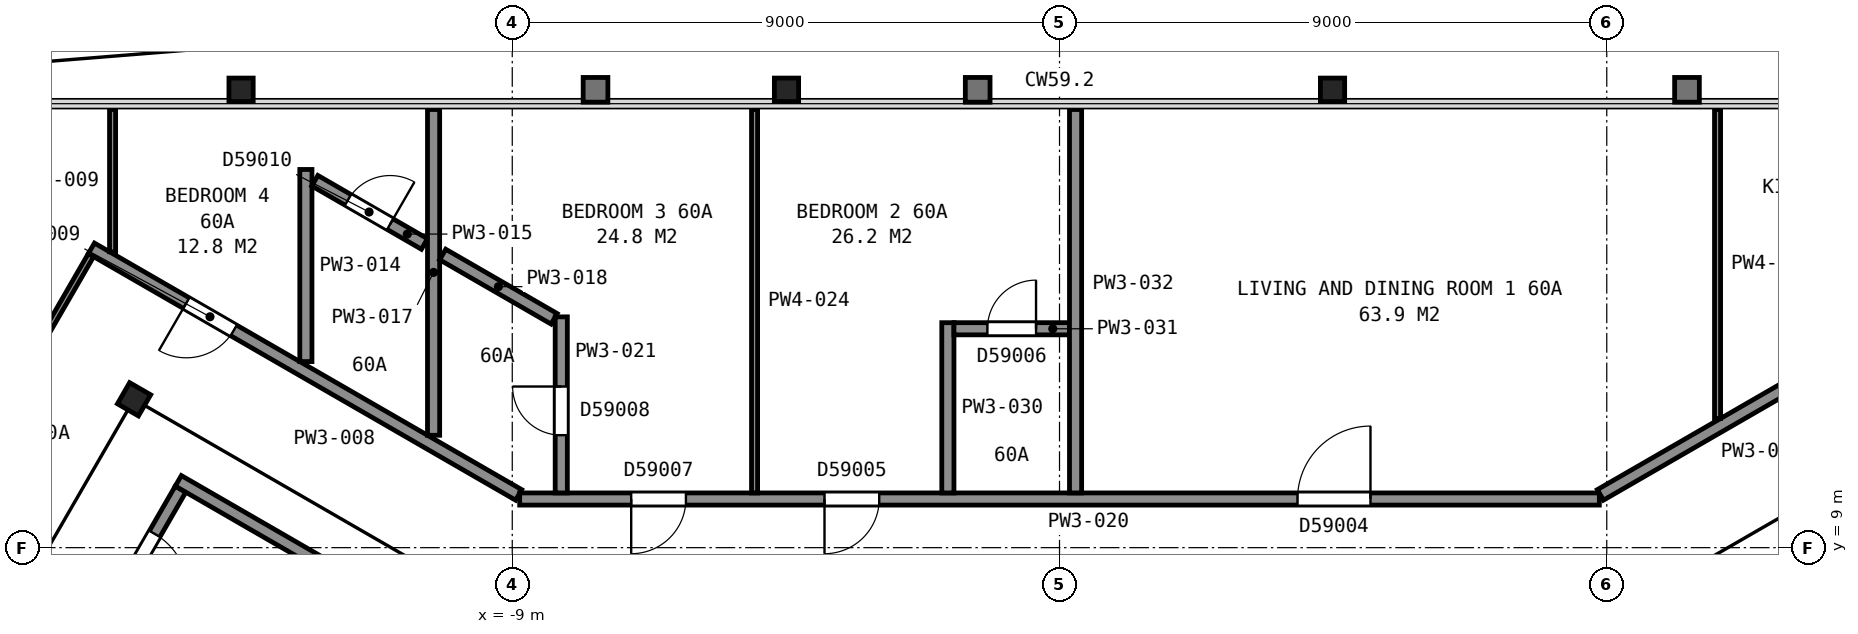
"""IFC4 building model, lengths in metres.
Left out: names, types, materials, properties, quantities, classifications, styles, units other than length and angle.
Written with IfcOpenShell. Run it as: python <this file> out.ifc"""

import sys

from ifc_helpers import new_model, si_unit, direction, frame, frame_2d, origin, origin_2d, place, context, subcontext, project, spatial, rectangle, i_section, extrude, element, fill, save


model = new_model("IFC4")
c1 = context("Model", 3, precision=1e-05, world=origin(), true_north=direction((0.0, 1.0)))
c2 = subcontext(c1, "Body", "Model", "MODEL_VIEW")
j1 = project(units=[si_unit("LENGTHUNIT", "METRE"), si_unit("PLANEANGLEUNIT", "RADIAN")], contexts=[c1])
p1 = place(None, origin())
s1 = spatial("IfcSite", under=j1, at=p1, CompositionType="ELEMENT")
p2 = place(p1, origin())
s2 = spatial("IfcBuilding", under=s1, at=p2, CompositionType="ELEMENT")
p3 = place(p2, frame((0.0, 0.0, 239.7)))
s3 = spatial("IfcBuildingStorey", under=s2, at=p3, CompositionType="ELEMENT", Elevation=239.7)
for number, where, z_axis, x_axis in (
    (1, (4.49, 16.53, 0.0), (0.0, 0.0, 1.0), (1.0, 0.0, 0.0)),
    (2, (-4.49, 16.53, 0.0), (0.0, 0.0, 1.0), (1.0, 0.0, 0.0)),
    (3, (-13.46, 16.53, 0.0), (0.0, 0.0, 1.0), (1.0, 0.0, 0.0)),
):
    element("IfcColumn", number, at=place(p3, frame(where, z_axis=z_axis, x_axis=x_axis)), inside=s3, PredefinedType="COLUMN", context=c2, shape_type="SweptSolid", body=[
        extrude(i_section(OverallWidth=0.399, OverallDepth=0.386, WebThickness=0.021, FlangeThickness=0.033, FilletRadius=0.015, at=origin_2d()), origin(), (0.0, 0.0, 1.0), 3.665),
    ])
p4 = place(p3, frame((-15.22, 11.44, 0.0), z_axis=(0.0, 0.0, 1.0), x_axis=(0.5, 0.866025403784, 0.0)))
e4 = element("IfcColumn", 4, at=p4, inside=s3, PredefinedType="COLUMN", context=c2, shape_type="SweptSolid", body=[
    extrude(i_section(OverallWidth=0.401, OverallDepth=0.399, WebThickness=0.025, FlangeThickness=0.04, FilletRadius=0.015, at=origin_2d()), origin(), (0.0, 0.0, 1.0), 3.7),
])
p5 = place(p3, frame((6.178, 5.299, 0.0), z_axis=(0.0, 0.0, 1.0), x_axis=(0.866019993635, 0.500009370536, 0.0)))
e5 = element("IfcWall", 5, at=p5, inside=s3, PredefinedType="PARTITIONING", context=c2, shape_type="SweptSolid", body=[
    extrude(rectangle(XDim=9.6, YDim=0.2, at=frame_2d((4.8, 0.0))), origin(), (0.0, 0.0, 1.0), 3.45),
])
p6 = place(p3, frame((-14.455, 9.962, 0.0), z_axis=(0.0, 0.0, 1.0), x_axis=(-0.500049511043, -0.865996816683, 0.0)))
e6 = element("IfcWall", 6, at=p6, inside=s3, PredefinedType="PARTITIONING", context=c2, shape_type="SweptSolid", body=[
    extrude(rectangle(XDim=2.8, YDim=0.2, at=frame_2d((1.4, 0.0))), origin(), (0.0, 0.0, 1.0), 3.45),
])
p7 = place(p6, frame((0.85, 0.0, 0.0)))
e7 = element("IfcOpeningElement", 7, at=p7, cuts=e6, PredefinedType="OPENING", context=c2, shape_type="SweptSolid", body=[
    extrude(rectangle(XDim=1.1, YDim=2.1, at=frame_2d((0.55, 1.05))), frame((0.0, 0.11, 0.0), z_axis=(0.0, -1.0, 0.0), x_axis=(1.0, 0.0, 0.0)), (0.0, 0.0, 1.0), 0.22),
])
p8 = place(p3, frame((-6.178, 5.299, 0.0), z_axis=(0.0, 0.0, 1.0), x_axis=(-0.866019993635, 0.500009370536, 0.0)))
e8 = element("IfcWall", 8, at=p8, inside=s3, PredefinedType="PARTITIONING", context=c2, shape_type="SweptSolid", body=[
    extrude(rectangle(XDim=9.6, YDim=0.2, at=frame_2d((4.8, 0.0))), origin(), (0.0, 0.0, 1.0), 3.45),
])
p9 = place(p3, frame((-19.93, 6.888, 0.0), z_axis=(0.0, 0.0, 1.0), x_axis=(0.500420003794, 0.865782778648, 0.0)))
e9 = element("IfcWall", 9, at=p9, inside=s3, PredefinedType="PARTITIONING", context=c2, shape_type="SweptSolid", body=[
    extrude(rectangle(XDim=7.997, YDim=0.1, at=frame_2d((3.999, 0.0))), origin(), (0.0, 0.0, 1.0), 2.713),
])
p10 = place(p9, frame((3.4, 0.0, 0.0)))
e10 = element("IfcOpeningElement", 10, at=p10, cuts=e9, PredefinedType="OPENING", context=c2, shape_type="SweptSolid", body=[
    extrude(rectangle(XDim=1.2, YDim=2.1, at=frame_2d((0.6, 1.05))), frame((0.0, 0.06, 0.0), z_axis=(0.0, -1.0, 0.0), x_axis=(1.0, 0.0, 0.0)), (0.0, 0.0, 1.0), 0.12),
])
p11 = place(p3, frame((-15.921, 13.923, 0.0), z_axis=(0.0, 0.0, 1.0), x_axis=(0.866079355551, -0.499906541154, 0.0)))
e11 = element("IfcWall", 11, at=p11, inside=s3, PredefinedType="PARTITIONING", context=c2, shape_type="SweptSolid", body=[
    extrude(rectangle(XDim=8.113, YDim=0.2, at=frame_2d((4.056, 0.0))), origin(), (0.0, 0.0, 1.0), 2.713),
])
p12 = place(p11, frame((1.802, 0.0, 0.0)))
e12 = element("IfcOpeningElement", 12, at=p12, cuts=e11, PredefinedType="OPENING", context=c2, shape_type="SweptSolid", body=[
    extrude(rectangle(XDim=0.9, YDim=2.1, at=frame_2d((0.45, 1.05))), frame((0.0, 0.11, 0.0), z_axis=(0.0, -1.0, 0.0), x_axis=(1.0, 0.0, 0.0)), (0.0, 0.0, 1.0), 0.22),
])
p13 = place(p3, frame((-15.573, 13.866, 0.0), z_axis=(0.0, 0.0, 1.0), x_axis=(0.0, 1.0, 0.0)))
e13 = element("IfcWall", 13, at=p13, inside=s3, PredefinedType="PARTITIONING", context=c2, shape_type="SweptSolid", body=[
    extrude(rectangle(XDim=2.34, YDim=0.1, at=frame_2d((1.17, 0.0))), origin(), (0.0, 0.0, 1.0), 2.713),
])
p14 = place(p3, frame((-12.394, 12.06, 0.0), z_axis=(0.0, 0.0, 1.0), x_axis=(0.0, 1.0, 0.0)))
e14 = element("IfcWall", 14, at=p14, inside=s3, PredefinedType="PARTITIONING", context=c2, shape_type="SweptSolid", body=[
    extrude(rectangle(XDim=3.16, YDim=0.2, at=frame_2d((1.58, 0.0))), origin(), (0.0, 0.0, 1.0), 2.713),
])
p15 = place(p3, frame((-10.444, 13.995, 0.0), z_axis=(0.0, 0.0, 1.0), x_axis=(-0.866134808485, 0.499810457605, 0.0)))
e15 = element("IfcWall", 15, at=p15, inside=s3, PredefinedType="PARTITIONING", context=c2, shape_type="SweptSolid", body=[
    extrude(rectangle(XDim=2.081, YDim=0.2, at=frame_2d((1.041, 0.0))), origin(), (0.0, 0.0, 1.0), 2.713),
])
p16 = place(p15, frame((0.651, 0.0, 0.0)))
e16 = element("IfcOpeningElement", 16, at=p16, cuts=e15, PredefinedType="OPENING", context=c2, shape_type="SweptSolid", body=[
    extrude(rectangle(XDim=0.8, YDim=2.1, at=frame_2d((0.4, 1.05))), frame((0.0, 0.11, 0.0), z_axis=(0.0, -1.0, 0.0), x_axis=(1.0, 0.0, 0.0)), (0.0, 0.0, 1.0), 0.22),
])
p17 = place(p3, frame((-10.294, 10.848, 0.0), z_axis=(0.0, 0.0, 1.0), x_axis=(0.0, 1.0, 0.0)))
e17 = element("IfcWall", 17, at=p17, inside=s3, PredefinedType="PARTITIONING", context=c2, shape_type="SweptSolid", body=[
    extrude(rectangle(XDim=5.358, YDim=0.2, at=frame_2d((2.679, 0.0))), origin(), (0.0, 0.0, 1.0), 2.713),
])
p18 = place(p3, frame((-10.144, 13.822, 0.0), z_axis=(0.0, 0.0, 1.0), x_axis=(0.866062654302, -0.49993547466, 0.0)))
e18 = element("IfcWall", 18, at=p18, inside=s3, PredefinedType="PARTITIONING", context=c2, shape_type="SweptSolid", body=[
    extrude(rectangle(XDim=2.116, YDim=0.2, at=frame_2d((1.058, 0.0))), origin(), (0.0, 0.0, 1.0), 2.713),
])
p19 = place(p3, frame((-8.878, 9.8, 0.0), z_axis=(0.0, 0.0, 1.0), x_axis=(1.0, 0.0, 0.0)))
e19 = element("IfcWall", 19, at=p19, inside=s3, PredefinedType="PARTITIONING", context=c2, shape_type="SweptSolid", body=[
    extrude(rectangle(XDim=17.756, YDim=0.2, at=frame_2d((8.878, 0.0))), origin(), (0.0, 0.0, 1.0), 2.713),
])
p20 = place(p19, frame((12.792, 0.0, 0.0)))
e20 = element("IfcOpeningElement", 20, at=p20, cuts=e19, PredefinedType="OPENING", context=c2, shape_type="SweptSolid", body=[
    extrude(rectangle(XDim=1.2, YDim=2.1, at=frame_2d((0.6, 1.05))), frame((0.0, 0.11, 0.0), z_axis=(0.0, -1.0, 0.0), x_axis=(1.0, 0.0, 0.0)), (0.0, 0.0, 1.0), 0.22),
])
p21 = place(p19, frame((5.013, 0.0, 0.0)))
e21 = element("IfcOpeningElement", 21, at=p21, cuts=e19, PredefinedType="OPENING", context=c2, shape_type="SweptSolid", body=[
    extrude(rectangle(XDim=0.9, YDim=2.1, at=frame_2d((0.45, 1.05))), frame((0.0, 0.11, 0.0), z_axis=(0.0, -1.0, 0.0), x_axis=(1.0, 0.0, 0.0)), (0.0, 0.0, 1.0), 0.22),
])
p22 = place(p19, frame((1.834, 0.0, 0.0)))
e22 = element("IfcOpeningElement", 22, at=p22, cuts=e19, PredefinedType="OPENING", context=c2, shape_type="SweptSolid", body=[
    extrude(rectangle(XDim=0.9, YDim=2.1, at=frame_2d((0.45, 1.05))), frame((0.0, 0.11, 0.0), z_axis=(0.0, -1.0, 0.0), x_axis=(1.0, 0.0, 0.0)), (0.0, 0.0, 1.0), 0.22),
])
p23 = place(p3, frame((-8.194, 9.9, 0.0), z_axis=(0.0, 0.0, 1.0), x_axis=(0.0, 1.0, 0.0)))
e23 = element("IfcWall", 23, at=p23, inside=s3, PredefinedType="PARTITIONING", context=c2, shape_type="SweptSolid", body=[
    extrude(rectangle(XDim=2.896, YDim=0.2, at=frame_2d((1.448, 0.0))), origin(), (0.0, 0.0, 1.0), 2.713),
])
p24 = place(p23, frame((0.95, 0.0, 0.0)))
e24 = element("IfcOpeningElement", 24, at=p24, cuts=e23, PredefinedType="OPENING", context=c2, shape_type="SweptSolid", body=[
    extrude(rectangle(XDim=0.8, YDim=2.1, at=frame_2d((0.4, 1.05))), frame((0.0, 0.11, 0.0), z_axis=(0.0, -1.0, 0.0), x_axis=(1.0, 0.0, 0.0)), (0.0, 0.0, 1.0), 0.22),
])
p25 = place(p3, frame((-5.015, 9.9, 0.0), z_axis=(0.0, 0.0, 1.0), x_axis=(0.0, 1.0, 0.0)))
e25 = element("IfcWall", 25, at=p25, inside=s3, PredefinedType="PARTITIONING", context=c2, shape_type="SweptSolid", body=[
    extrude(rectangle(XDim=6.306, YDim=0.1, at=frame_2d((3.153, 0.0))), origin(), (0.0, 0.0, 1.0), 2.713),
])
p26 = place(p3, frame((-1.836, 9.9, 0.0), z_axis=(0.0, 0.0, 1.0), x_axis=(0.0, 1.0, 0.0)))
e26 = element("IfcWall", 26, at=p26, inside=s3, PredefinedType="PARTITIONING", context=c2, shape_type="SweptSolid", body=[
    extrude(rectangle(XDim=2.8, YDim=0.2, at=frame_2d((1.4, 0.0))), origin(), (0.0, 0.0, 1.0), 2.713),
])
p27 = place(p3, frame((0.164, 12.6, 0.0), z_axis=(0.0, 0.0, 1.0), x_axis=(-1.0, 0.0, 0.0)))
e27 = element("IfcWall", 27, at=p27, inside=s3, PredefinedType="PARTITIONING", context=c2, shape_type="SweptSolid", body=[
    extrude(rectangle(XDim=1.9, YDim=0.2, at=frame_2d((0.95, 0.0))), origin(), (0.0, 0.0, 1.0), 2.713),
])
p28 = place(p27, frame((0.55, 0.0, 0.0)))
e28 = element("IfcOpeningElement", 28, at=p28, cuts=e27, PredefinedType="OPENING", context=c2, shape_type="SweptSolid", body=[
    extrude(rectangle(XDim=0.8, YDim=2.1, at=frame_2d((0.4, 1.05))), frame((0.0, 0.11, 0.0), z_axis=(0.0, -1.0, 0.0), x_axis=(1.0, 0.0, 0.0)), (0.0, 0.0, 1.0), 0.22),
])
p29 = place(p3, frame((0.264, 9.9, 0.0), z_axis=(0.0, 0.0, 1.0), x_axis=(0.0, 1.0, 0.0)))
e29 = element("IfcWall", 29, at=p29, inside=s3, PredefinedType="PARTITIONING", context=c2, shape_type="SweptSolid", body=[
    extrude(rectangle(XDim=6.306, YDim=0.2, at=frame_2d((3.153, 0.0))), origin(), (0.0, 0.0, 1.0), 2.713),
])
p30 = place(p3, frame((8.895, 9.867, 0.0), z_axis=(0.0, 0.0, 1.0), x_axis=(0.866081499088, 0.499902827495, 0.0)))
e30 = element("IfcWall", 30, at=p30, inside=s3, PredefinedType="PARTITIONING", context=c2, shape_type="SweptSolid", body=[
    extrude(rectangle(XDim=8.163, YDim=0.2, at=frame_2d((4.081, 0.0))), origin(), (0.0, 0.0, 1.0), 2.713),
])
p31 = place(p30, frame((4.525, 0.0, 0.0)))
e31 = element("IfcOpeningElement", 31, at=p31, cuts=e30, PredefinedType="OPENING", context=c2, shape_type="SweptSolid", body=[
    extrude(rectangle(XDim=0.9, YDim=2.1, at=frame_2d((0.45, 1.05))), frame((0.0, 0.11, 0.0), z_axis=(0.0, -1.0, 0.0), x_axis=(1.0, 0.0, 0.0)), (0.0, 0.0, 1.0), 0.22),
])
p32 = place(p3, frame((10.822, 11.124, 0.0), z_axis=(0.0, 0.0, 1.0), x_axis=(0.0, 1.0, 0.0)))
e32 = element("IfcWall", 32, at=p32, inside=s3, PredefinedType="PARTITIONING", context=c2, shape_type="SweptSolid", body=[
    extrude(rectangle(XDim=5.082, YDim=0.1, at=frame_2d((2.541, 0.0))), origin(), (0.0, 0.0, 1.0), 2.713),
])
p33 = place(p7, origin())
e33 = element("IfcDoor", 33, at=p33, inside=s3, OperationType="SINGLE_SWING_RIGHT", PredefinedType="DOOR", context=c2, shape_type="SweptSolid", body=[
    extrude(rectangle(XDim=1.1, YDim=2.1, at=frame_2d((0.55, 1.05))), frame((0.0, 0.025, 0.0), z_axis=(0.0, -1.0, 0.0), x_axis=(1.0, 0.0, 0.0)), (0.0, 0.0, 1.0), 0.05),
])
fill(e7, e33)
p34 = place(p12, origin())
e34 = element("IfcDoor", 34, at=p34, inside=s3, OperationType="SINGLE_SWING_LEFT", PredefinedType="DOOR", context=c2, shape_type="SweptSolid", body=[
    extrude(rectangle(XDim=0.9, YDim=2.1, at=frame_2d((0.45, 1.05))), frame((0.0, 0.025, 0.0), z_axis=(0.0, -1.0, 0.0), x_axis=(1.0, 0.0, 0.0)), (0.0, 0.0, 1.0), 0.05),
])
fill(e12, e34)
p35 = place(p16, origin())
e35 = element("IfcDoor", 35, at=p35, inside=s3, OperationType="SINGLE_SWING_LEFT", PredefinedType="DOOR", context=c2, shape_type="SweptSolid", body=[
    extrude(rectangle(XDim=0.8, YDim=2.1, at=frame_2d((0.4, 1.05))), frame((0.0, 0.025, 0.0), z_axis=(0.0, -1.0, 0.0), x_axis=(1.0, 0.0, 0.0)), (0.0, 0.0, 1.0), 0.05),
])
fill(e16, e35)
p36 = place(p20, origin())
e36 = element("IfcDoor", 36, at=p36, inside=s3, OperationType="SINGLE_SWING_RIGHT", PredefinedType="DOOR", context=c2, shape_type="SweptSolid", body=[
    extrude(rectangle(XDim=1.2, YDim=2.1, at=frame_2d((0.6, 1.05))), frame((0.0, 0.025, 0.0), z_axis=(0.0, -1.0, 0.0), x_axis=(1.0, 0.0, 0.0)), (0.0, 0.0, 1.0), 0.05),
])
fill(e20, e36)
p37 = place(p21, origin())
e37 = element("IfcDoor", 37, at=p37, inside=s3, OperationType="SINGLE_SWING_LEFT", PredefinedType="DOOR", context=c2, shape_type="SweptSolid", body=[
    extrude(rectangle(XDim=0.9, YDim=2.1, at=frame_2d((0.45, 1.05))), frame((0.0, 0.025, 0.0), z_axis=(0.0, -1.0, 0.0), x_axis=(1.0, 0.0, 0.0)), (0.0, 0.0, 1.0), 0.05),
])
fill(e21, e37)
p38 = place(p22, origin())
e38 = element("IfcDoor", 38, at=p38, inside=s3, OperationType="SINGLE_SWING_LEFT", PredefinedType="DOOR", context=c2, shape_type="SweptSolid", body=[
    extrude(rectangle(XDim=0.9, YDim=2.1, at=frame_2d((0.45, 1.05))), frame((0.0, 0.025, 0.0), z_axis=(0.0, -1.0, 0.0), x_axis=(1.0, 0.0, 0.0)), (0.0, 0.0, 1.0), 0.05),
])
fill(e22, e38)
p39 = place(p24, origin())
e39 = element("IfcDoor", 39, at=p39, inside=s3, OperationType="SINGLE_SWING_RIGHT", PredefinedType="DOOR", context=c2, shape_type="SweptSolid", body=[
    extrude(rectangle(XDim=0.8, YDim=2.1, at=frame_2d((0.4, 1.05))), frame((0.0, 0.025, 0.0), z_axis=(0.0, -1.0, 0.0), x_axis=(1.0, 0.0, 0.0)), (0.0, 0.0, 1.0), 0.05),
])
fill(e24, e39)
p40 = place(p28, origin())
e40 = element("IfcDoor", 40, at=p40, inside=s3, OperationType="SINGLE_SWING_LEFT", PredefinedType="DOOR", context=c2, shape_type="SweptSolid", body=[
    extrude(rectangle(XDim=0.8, YDim=2.1, at=frame_2d((0.4, 1.05))), frame((0.0, 0.025, 0.0), z_axis=(0.0, -1.0, 0.0), x_axis=(1.0, 0.0, 0.0)), (0.0, 0.0, 1.0), 0.05),
])
fill(e28, e40)
save(model, sys.argv[1])
